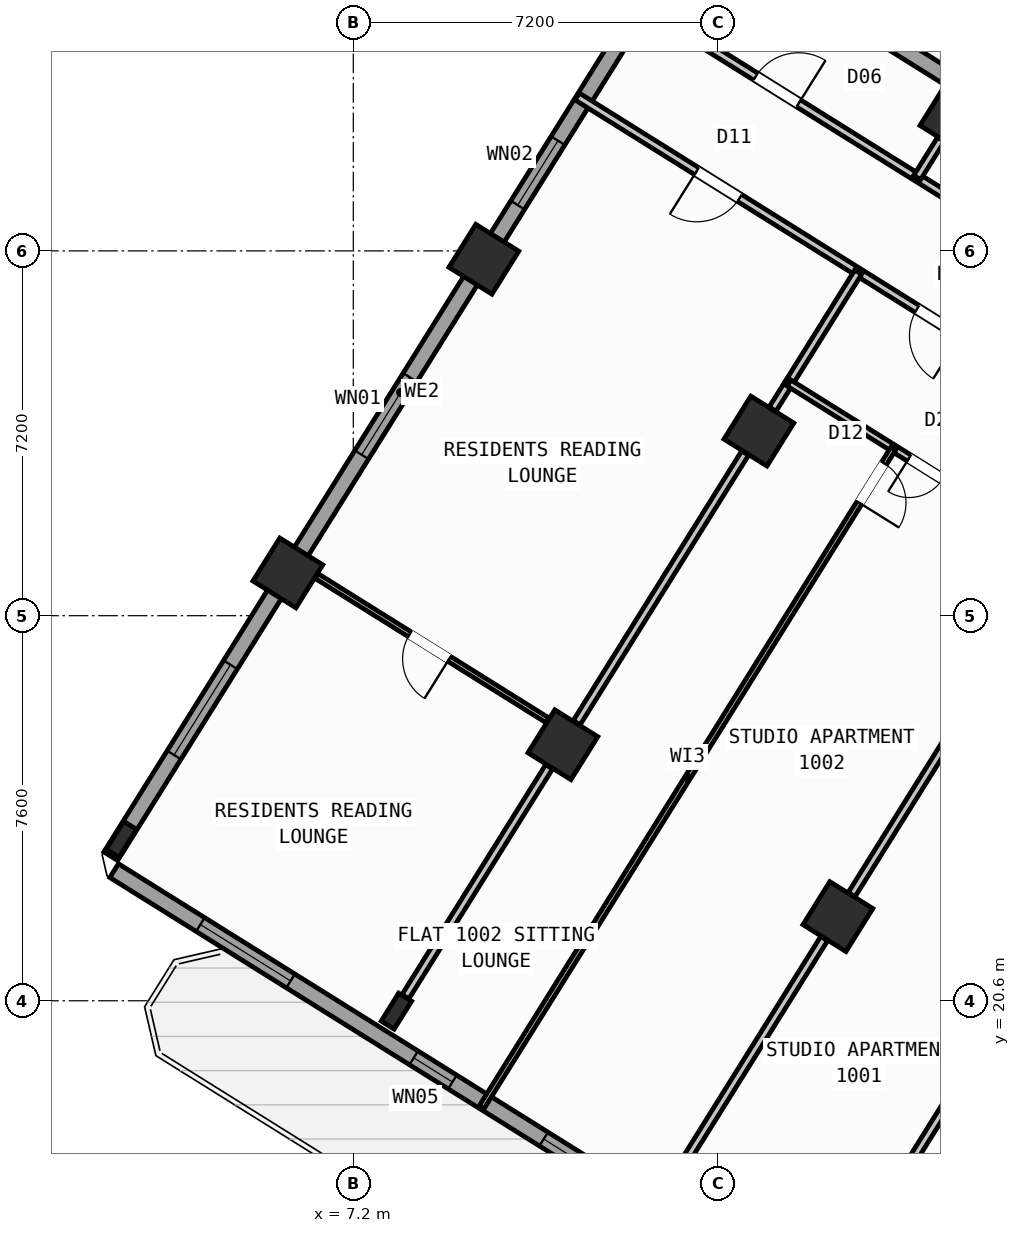
"""IFC4 building model, lengths in metres.
Left out: names, types, materials, properties, quantities, classifications, styles, units other than length and angle.
Written with IfcOpenShell. Run it as: python <this file> out.ifc"""

import sys

from ifc_helpers import new_model, si_unit, direction, frame, frame_2d, origin, origin_2d, place, context, subcontext, project, spatial, rectangle, hollow_rectangle, i_section, extrude, source, transform, mapped, element, fill, save


model = new_model("IFC4")
c1 = context("Model", 3, precision=1e-05, world=origin(), true_north=direction((0.0, 1.0)))
c2 = subcontext(c1, "Body", "Model", "MODEL_VIEW")
j1 = project(units=[si_unit("LENGTHUNIT", "METRE"), si_unit("PLANEANGLEUNIT", "RADIAN")], contexts=[c1])
p1 = place(None, origin())
s1 = spatial("IfcSite", under=j1, at=p1, CompositionType="ELEMENT")
p2 = place(p1, origin())
s2 = spatial("IfcBuilding", under=s1, at=p2, CompositionType="ELEMENT")
p3 = place(p2, frame((0.0, 0.0, 42.0)))
s3 = spatial("IfcBuildingStorey", under=s2, at=p3, CompositionType="ELEMENT", Elevation=42.0)
m1 = source(origin(), c2, "Body", "SweptSolid", [
    extrude(hollow_rectangle(XDim=1.0, YDim=1.0, WallThickness=0.04, at=origin_2d()), origin(), (0.0, 0.0, 1.0), 3.6),
])
for number, where, z_axis, x_axis in (
    (1, (16.764, 22.261, 0.0), (0.0, 0.0, 1.0), (-0.848, 0.53, 0.0)),
    (2, (19.073, 38.034, 0.0), (0.0, 0.0, 1.0), (-0.848, 0.53, 0.0)),
    (3, (15.205, 31.844, 0.0), (0.0, 0.0, 1.0), (-0.848, 0.53, 0.0)),
    (4, (11.336, 25.653, 0.0), (0.0, 0.0, 1.0), (-0.848, 0.53, 0.0)),
):
    element("IfcColumn", number, at=place(p3, frame(where, z_axis=z_axis, x_axis=x_axis)), inside=s3, PredefinedType="COLUMN", context=c2, shape_type="MappedRepresentation", body=[
        mapped(m1, transform((0.0, 0.0, 0.0), scale=1.0)),
    ])
m2 = source(origin(), c2, "Body", "SweptSolid", [
    extrude(i_section(OverallWidth=0.3, OverallDepth=0.65, WebThickness=0.016, FlangeThickness=0.031, at=origin_2d()), origin(), (0.0, 0.0, 1.0), 3.6),
])
p4 = place(p3, frame((8.051, 20.395, 0.0), z_axis=(0.0, 0.0, 1.0), x_axis=(-0.848048096156, 0.529919264233, 0.0)))
e5 = element("IfcColumn", 5, at=p4, inside=s3, PredefinedType="COLUMN", context=c2, shape_type="MappedRepresentation", body=[
    mapped(m2, transform((0.0, 0.0, 0.0), scale=1.0)),
])
for number, where, z_axis, x_axis in (
    (6, (9.777, 35.235, 0.0), (0.0, 0.0, 1.0), (-0.848, 0.53, 0.0)),
    (7, (5.909, 29.044, 0.0), (0.0, 0.0, 1.0), (-0.848, 0.53, 0.0)),
):
    element("IfcColumn", number, at=place(p3, frame(where, z_axis=z_axis, x_axis=x_axis)), inside=s3, PredefinedType="COLUMN", context=c2, shape_type="MappedRepresentation", body=[
        mapped(m1, transform((0.0, 0.0, 0.0), scale=1.0)),
    ])
p5 = place(p3, frame((2.623, 23.786, 0.0), z_axis=(0.0, 0.0, 1.0), x_axis=(-0.848048096156, 0.529919264233, 0.0)))
e8 = element("IfcColumn", 8, at=p5, inside=s3, PredefinedType="COLUMN", context=c2, shape_type="MappedRepresentation", body=[
    mapped(m2, transform((0.0, 0.0, 0.0), scale=1.0)),
])
p6 = place(p3, frame((29.268, 6.429, 0.0), z_axis=(0.0, 0.0, 1.0), x_axis=(-0.848049971435, 0.529916263149, 0.0)))
e9 = element("IfcWall", 9, at=p6, inside=s3, PredefinedType="STANDARD", context=c2, shape_type="SweptSolid", body=[
    extrude(rectangle(XDim=31.588, YDim=0.32, at=frame_2d((15.794, 0.0))), origin(), (0.0, 0.0, 1.0), 3.35),
])
p7 = place(p6, frame((16.362, 0.0, 0.0)))
e10 = element("IfcOpeningElement", 10, at=p7, cuts=e9, PredefinedType="OPENING", context=c2, shape_type="SweptSolid", body=[
    extrude(rectangle(XDim=1.2, YDim=2.15, at=frame_2d((0.6, 1.075))), frame((0.0, 0.17, 0.0), z_axis=(0.0, -1.0, 0.0), x_axis=(1.0, 0.0, 0.0)), (0.0, 0.0, 1.0), 0.34),
])
p8 = place(p6, frame((2.989, 0.0, 0.8)))
e11 = element("IfcOpeningElement", 11, at=p8, cuts=e9, PredefinedType="OPENING", context=c2, shape_type="SweptSolid", body=[
    extrude(rectangle(XDim=2.1, YDim=1.55, at=frame_2d((1.05, 0.775))), frame((0.0, 0.17, 0.0), z_axis=(0.0, -1.0, 0.0), x_axis=(1.0, 0.0, 0.0)), (0.0, 0.0, 1.0), 0.34),
])
p9 = place(p6, frame((8.359, 0.0, 0.8)))
e12 = element("IfcOpeningElement", 12, at=p9, cuts=e9, PredefinedType="OPENING", context=c2, shape_type="SweptSolid", body=[
    extrude(rectangle(XDim=2.1, YDim=1.55, at=frame_2d((1.05, 0.775))), frame((0.0, 0.17, 0.0), z_axis=(0.0, -1.0, 0.0), x_axis=(1.0, 0.0, 0.0)), (0.0, 0.0, 1.0), 0.34),
])
p10 = place(p6, frame((13.284, 0.0, 0.95)))
e13 = element("IfcOpeningElement", 13, at=p10, cuts=e9, PredefinedType="OPENING", context=c2, shape_type="SweptSolid", body=[
    extrude(rectangle(XDim=1.2, YDim=1.4, at=frame_2d((0.6, 0.7))), frame((0.0, 0.17, 0.0), z_axis=(0.0, -1.0, 0.0), x_axis=(1.0, 0.0, 0.0)), (0.0, 0.0, 1.0), 0.34),
])
p11 = place(p6, frame((20.39, 0.0, 0.95)))
e14 = element("IfcOpeningElement", 14, at=p11, cuts=e9, PredefinedType="OPENING", context=c2, shape_type="SweptSolid", body=[
    extrude(rectangle(XDim=1.2, YDim=1.4, at=frame_2d((0.6, 0.7))), frame((0.0, 0.17, 0.0), z_axis=(0.0, -1.0, 0.0), x_axis=(1.0, 0.0, 0.0)), (0.0, 0.0, 1.0), 0.34),
])
p12 = place(p6, frame((23.715, 0.0, 1.0)))
e15 = element("IfcOpeningElement", 15, at=p12, cuts=e9, PredefinedType="OPENING", context=c2, shape_type="SweptSolid", body=[
    extrude(rectangle(XDim=0.9, YDim=1.25, at=frame_2d((0.45, 0.625))), frame((0.0, 0.17, 0.0), z_axis=(0.0, -1.0, 0.0), x_axis=(1.0, 0.0, 0.0)), (0.0, 0.0, 1.0), 0.34),
])
p13 = place(p6, frame((27.481, 0.0, 0.8)))
e16 = element("IfcOpeningElement", 16, at=p13, cuts=e9, PredefinedType="OPENING", context=c2, shape_type="SweptSolid", body=[
    extrude(rectangle(XDim=2.1, YDim=1.55, at=frame_2d((1.05, 0.775))), frame((0.0, 0.17, 0.0), z_axis=(0.0, -1.0, 0.0), x_axis=(1.0, 0.0, 0.0)), (0.0, 0.0, 1.0), 0.34),
])
p14 = place(p3, frame((2.415, 23.452, 0.0), z_axis=(0.0, 0.0, 1.0), x_axis=(0.52991049553, 0.848053575387, 0.0)))
e17 = element("IfcWall", 17, at=p14, inside=s3, PredefinedType="STANDARD", context=c2, shape_type="SweptSolid", body=[
    extrude(rectangle(XDim=21.587, YDim=0.32, at=frame_2d((10.794, 0.0))), origin(), (0.0, 0.0, 1.0), 2.725),
])
p15 = place(p14, frame((2.356, 0.0, 0.8)))
e18 = element("IfcOpeningElement", 18, at=p15, cuts=e17, PredefinedType="OPENING", context=c2, shape_type="SweptSolid", body=[
    extrude(rectangle(XDim=2.1, YDim=1.55, at=frame_2d((1.05, 0.775))), frame((0.0, 0.17, 0.0), z_axis=(0.0, -1.0, 0.0), x_axis=(1.0, 0.0, 0.0)), (0.0, 0.0, 1.0), 0.34),
])
p16 = place(p14, frame((9.344, 0.0, 0.85)))
e19 = element("IfcOpeningElement", 19, at=p16, cuts=e17, PredefinedType="OPENING", context=c2, shape_type="SweptSolid", body=[
    extrude(rectangle(XDim=1.8, YDim=1.5, at=frame_2d((0.9, 0.75))), frame((0.0, 0.17, 0.0), z_axis=(0.0, -1.0, 0.0), x_axis=(1.0, 0.0, 0.0)), (0.0, 0.0, 1.0), 0.34),
])
p17 = place(p14, frame((15.154, 0.0, 0.85)))
e20 = element("IfcOpeningElement", 20, at=p17, cuts=e17, PredefinedType="OPENING", context=c2, shape_type="SweptSolid", body=[
    extrude(rectangle(XDim=1.5, YDim=1.5, at=frame_2d((0.75, 0.75))), frame((0.0, 0.17, 0.0), z_axis=(0.0, -1.0, 0.0), x_axis=(1.0, 0.0, 0.0)), (0.0, 0.0, 1.0), 0.34),
])
p18 = place(p3, frame((14.138, 41.825, 0.0), z_axis=(0.0, 0.0, 1.0), x_axis=(0.848046498049, -0.529921821731, 0.0)))
e21 = element("IfcWall", 21, at=p18, inside=s3, PredefinedType="STANDARD", context=c2, shape_type="SweptSolid", body=[
    extrude(rectangle(XDim=31.588, YDim=0.32, at=frame_2d((15.794, 0.0))), origin(), (0.0, 0.0, 1.0), 3.35),
])
p19 = place(p18, frame((3.369, 0.0, 0.0)))
e22 = element("IfcOpeningElement", 22, at=p19, cuts=e21, PredefinedType="OPENING", context=c2, shape_type="SweptSolid", body=[
    extrude(rectangle(XDim=1.05, YDim=2.15, at=frame_2d((0.525, 1.075))), frame((0.0, 0.17, 0.0), z_axis=(0.0, -1.0, 0.0), x_axis=(1.0, 0.0, 0.0)), (0.0, 0.0, 1.0), 0.34),
])
p20 = place(p18, frame((0.946, 0.0, 0.85)))
e23 = element("IfcOpeningElement", 23, at=p20, cuts=e21, PredefinedType="OPENING", context=c2, shape_type="SweptSolid", body=[
    extrude(rectangle(XDim=1.8, YDim=1.5, at=frame_2d((0.9, 0.75))), frame((0.0, 0.17, 0.0), z_axis=(0.0, -1.0, 0.0), x_axis=(1.0, 0.0, 0.0)), (0.0, 0.0, 1.0), 0.34),
])
p21 = place(p18, frame((8.46, 0.0, 0.85)))
e24 = element("IfcOpeningElement", 24, at=p21, cuts=e21, PredefinedType="OPENING", context=c2, shape_type="SweptSolid", body=[
    extrude(rectangle(XDim=1.8, YDim=1.5, at=frame_2d((0.9, 0.75))), frame((0.0, 0.17, 0.0), z_axis=(0.0, -1.0, 0.0), x_axis=(1.0, 0.0, 0.0)), (0.0, 0.0, 1.0), 0.34),
])
p22 = place(p18, frame((13.899, 0.0, 0.85)))
e25 = element("IfcOpeningElement", 25, at=p22, cuts=e21, PredefinedType="OPENING", context=c2, shape_type="SweptSolid", body=[
    extrude(rectangle(XDim=1.5, YDim=1.5, at=frame_2d((0.75, 0.75))), frame((0.0, 0.17, 0.0), z_axis=(0.0, -1.0, 0.0), x_axis=(1.0, 0.0, 0.0)), (0.0, 0.0, 1.0), 0.34),
])
p23 = place(p18, frame((22.019, 0.0, 0.95)))
e26 = element("IfcOpeningElement", 26, at=p23, cuts=e21, PredefinedType="OPENING", context=c2, shape_type="SweptSolid", body=[
    extrude(rectangle(XDim=1.2, YDim=1.4, at=frame_2d((0.6, 0.7))), frame((0.0, 0.17, 0.0), z_axis=(0.0, -1.0, 0.0), x_axis=(1.0, 0.0, 0.0)), (0.0, 0.0, 1.0), 0.34),
])
p24 = place(p18, frame((27.569, 0.0, 0.95)))
e27 = element("IfcOpeningElement", 27, at=p24, cuts=e21, PredefinedType="OPENING", context=c2, shape_type="SweptSolid", body=[
    extrude(rectangle(XDim=1.2, YDim=1.4, at=frame_2d((0.6, 0.7))), frame((0.0, 0.17, 0.0), z_axis=(0.0, -1.0, 0.0), x_axis=(1.0, 0.0, 0.0)), (0.0, 0.0, 1.0), 0.34),
])
p25 = place(p3, frame((25.807, 29.582, 0.0), z_axis=(0.0, 0.0, 1.0), x_axis=(-0.529918119251, -0.84804881162, 0.0)))
e28 = element("IfcWall", 28, at=p25, inside=s3, PredefinedType="PARTITIONING", context=c2, shape_type="SweptSolid", body=[
    extrude(rectangle(XDim=17.65, YDim=0.16, at=frame_2d((8.825, 0.0))), origin(), (0.0, 0.0, 1.0), 3.34),
])
p26 = place(p3, frame((26.973, 31.447, 0.0), z_axis=(0.0, 0.0, 1.0), x_axis=(-0.848048310262, 0.529918921593, 0.0)))
e29 = element("IfcWall", 29, at=p26, inside=s3, PredefinedType="PARTITIONING", context=c2, shape_type="SweptSolid", body=[
    extrude(rectangle(XDim=16.73, YDim=0.16, at=frame_2d((8.365, 0.0))), origin(), (0.0, 0.0, 1.0), 3.34),
])
p27 = place(p26, frame((1.588, 0.0, 0.0)))
e30 = element("IfcOpeningElement", 30, at=p27, cuts=e29, PredefinedType="OPENING", context=c2, shape_type="SweptSolid", body=[
    extrude(rectangle(XDim=1.0, YDim=2.1, at=frame_2d((0.5, 1.05))), frame((0.0, 0.09, 0.0), z_axis=(0.0, -1.0, 0.0), x_axis=(1.0, 0.0, 0.0)), (0.0, 0.0, 1.0), 0.18),
])
p28 = place(p26, frame((6.685, 0.0, 0.0)))
e31 = element("IfcOpeningElement", 31, at=p28, cuts=e29, PredefinedType="OPENING", context=c2, shape_type="SweptSolid", body=[
    extrude(rectangle(XDim=1.0, YDim=2.1, at=frame_2d((0.5, 1.05))), frame((0.0, 0.09, 0.0), z_axis=(0.0, -1.0, 0.0), x_axis=(1.0, 0.0, 0.0)), (0.0, 0.0, 1.0), 0.18),
])
p29 = place(p26, frame((12.951, 0.0, 0.0)))
e32 = element("IfcOpeningElement", 32, at=p29, cuts=e29, PredefinedType="OPENING", context=c2, shape_type="SweptSolid", body=[
    extrude(rectangle(XDim=1.0, YDim=2.1, at=frame_2d((0.5, 1.05))), frame((0.0, 0.09, 0.0), z_axis=(0.0, -1.0, 0.0), x_axis=(1.0, 0.0, 0.0)), (0.0, 0.0, 1.0), 0.18),
])
p30 = place(p3, frame((25.807, 29.582, 0.0), z_axis=(0.0, 0.0, 1.0), x_axis=(-0.848052408131, 0.529912363569, 0.0)))
e33 = element("IfcWall", 33, at=p30, inside=s3, PredefinedType="PARTITIONING", context=c2, shape_type="SweptSolid", body=[
    extrude(rectangle(XDim=16.73, YDim=0.16, at=frame_2d((8.365, 0.0))), origin(), (0.0, 0.0, 1.0), 3.34),
])
p31 = place(p30, frame((2.22, 0.0, 0.0)))
e34 = element("IfcOpeningElement", 34, at=p31, cuts=e33, PredefinedType="OPENING", context=c2, shape_type="SweptSolid", body=[
    extrude(rectangle(XDim=0.86, YDim=2.05, at=frame_2d((0.43, 1.025))), frame((0.0, 0.09, 0.0), z_axis=(0.0, -1.0, 0.0), x_axis=(1.0, 0.0, 0.0)), (0.0, 0.0, 1.0), 0.18),
])
p32 = place(p30, frame((7.82, 0.0, 0.0)))
e35 = element("IfcOpeningElement", 35, at=p32, cuts=e33, PredefinedType="OPENING", context=c2, shape_type="SweptSolid", body=[
    extrude(rectangle(XDim=1.0, YDim=2.1, at=frame_2d((0.5, 1.05))), frame((0.0, 0.09, 0.0), z_axis=(0.0, -1.0, 0.0), x_axis=(1.0, 0.0, 0.0)), (0.0, 0.0, 1.0), 0.18),
])
p33 = place(p30, frame((12.95, 0.0, 0.0)))
e36 = element("IfcOpeningElement", 36, at=p33, cuts=e33, PredefinedType="OPENING", context=c2, shape_type="SweptSolid", body=[
    extrude(rectangle(XDim=1.0, YDim=2.1, at=frame_2d((0.5, 1.05))), frame((0.0, 0.09, 0.0), z_axis=(0.0, -1.0, 0.0), x_axis=(1.0, 0.0, 0.0)), (0.0, 0.0, 1.0), 0.18),
])
p34 = place(p3, frame((20.361, 28.018, 0.0), z_axis=(0.0, 0.0, 1.0), x_axis=(-0.529915015264, -0.848050751193, 0.0)))
e37 = element("IfcWall", 37, at=p34, inside=s3, PredefinedType="PARTITIONING", context=c2, shape_type="SweptSolid", body=[
    extrude(rectangle(XDim=6.276, YDim=0.16, at=frame_2d((3.138, 0.0))), origin(), (0.0, 0.0, 1.0), 2.725),
])
p35 = place(p3, frame((16.492, 21.827, 0.0), z_axis=(0.0, 0.0, 1.0), x_axis=(-0.529904608059, -0.848057254175, 0.0)))
e38 = element("IfcWall", 38, at=p35, inside=s3, PredefinedType="PARTITIONING", context=c2, shape_type="SweptSolid", body=[
    extrude(rectangle(XDim=5.351, YDim=0.16, at=frame_2d((2.675, 0.0))), origin(), (0.0, 0.0, 1.0), 2.725),
])
p36 = place(p3, frame((17.165, 34.981, 0.0), z_axis=(0.0, 0.0, 1.0), x_axis=(-0.529930102756, -0.848041323399, 0.0)))
e39 = element("IfcWall", 39, at=p36, inside=s3, PredefinedType="PARTITIONING", context=c2, shape_type="SweptSolid", body=[
    extrude(rectangle(XDim=3.188, YDim=0.16, at=frame_2d((1.594, 0.0))), origin(), (0.0, 0.0, 1.0), 2.725),
])
p37 = place(p3, frame((14.933, 31.409, 0.0), z_axis=(0.0, 0.0, 1.0), x_axis=(-0.529897533635, -0.848061674554, 0.0)))
e40 = element("IfcWall", 40, at=p37, inside=s3, PredefinedType="PARTITIONING", context=c2, shape_type="SweptSolid", body=[
    extrude(rectangle(XDim=6.276, YDim=0.16, at=frame_2d((3.138, 0.0))), origin(), (0.0, 0.0, 1.0), 2.725),
])
p38 = place(p3, frame((11.065, 25.219, 0.0), z_axis=(0.0, 0.0, 1.0), x_axis=(-0.529904608059, -0.848057254175, 0.0)))
e41 = element("IfcWall", 41, at=p38, inside=s3, PredefinedType="PARTITIONING", context=c2, shape_type="SweptSolid", body=[
    extrude(rectangle(XDim=5.351, YDim=0.16, at=frame_2d((2.675, 0.0))), origin(), (0.0, 0.0, 1.0), 2.725),
])
p39 = place(p3, frame((21.226, 29.402, 0.0), z_axis=(0.0, 0.0, 1.0), x_axis=(-0.848039019877, 0.529933789039, 0.0)))
e42 = element("IfcWall", 42, at=p39, inside=s3, PredefinedType="PLUMBINGWALL", context=c2, shape_type="SweptSolid", body=[
    extrude(rectangle(XDim=6.4, YDim=0.14, at=frame_2d((3.2, 0.0))), origin(), (0.0, 0.0, 1.0), 3.34),
])
p40 = place(p39, frame((2.824, 0.0, 0.0)))
e43 = element("IfcOpeningElement", 43, at=p40, cuts=e42, PredefinedType="OPENING", context=c2, shape_type="SweptSolid", body=[
    extrude(rectangle(XDim=0.78, YDim=2.05, at=frame_2d((0.39, 1.025))), frame((0.0, 0.08, 0.0), z_axis=(0.0, -1.0, 0.0), x_axis=(1.0, 0.0, 0.0)), (0.0, 0.0, 1.0), 0.16),
])
p41 = place(p3, frame((17.861, 31.505, 0.0), z_axis=(0.0, 0.0, 1.0), x_axis=(-0.529928839727, -0.848042112649, 0.0)))
e44 = element("IfcWall", 44, at=p41, inside=s3, PredefinedType="PARTITIONING", context=c2, shape_type="SweptSolid", body=[
    extrude(rectangle(XDim=15.34, YDim=0.11, at=frame_2d((7.67, 0.0))), origin(), (0.0, 0.0, 1.0), 3.34),
])
p42 = place(p41, frame((0.35, 0.0, 0.0)))
e45 = element("IfcOpeningElement", 45, at=p42, cuts=e44, PredefinedType="OPENING", context=c2, shape_type="SweptSolid", body=[
    extrude(rectangle(XDim=0.92, YDim=2.08, at=frame_2d((0.46, 1.04))), frame((0.0, 0.065, 0.0), z_axis=(0.0, -1.0, 0.0), x_axis=(1.0, 0.0, 0.0)), (0.0, 0.0, 1.0), 0.13),
])
p43 = place(p3, frame((11.033, 26.135, 0.0), z_axis=(0.0, 0.0, 1.0), x_axis=(-0.848044224181, 0.529925460639, 0.0)))
e46 = element("IfcWall", 46, at=p43, inside=s3, PredefinedType="PARTITIONING", context=c2, shape_type="SweptSolid", body=[
    extrude(rectangle(XDim=5.376, YDim=0.11, at=frame_2d((2.688, 0.0))), origin(), (0.0, 0.0, 1.0), 2.725),
])
p44 = place(p43, frame((2.288, 0.0, 0.0)))
e47 = element("IfcOpeningElement", 47, at=p44, cuts=e46, PredefinedType="OPENING", context=c2, shape_type="SweptSolid", body=[
    extrude(rectangle(XDim=0.92, YDim=2.08, at=frame_2d((0.46, 1.04))), frame((0.0, 0.065, 0.0), z_axis=(0.0, -1.0, 0.0), x_axis=(1.0, 0.0, 0.0)), (0.0, 0.0, 1.0), 0.13),
])
p45 = place(p3, frame((18.799, 37.602, 0.0), z_axis=(0.0, 0.0, 1.0), x_axis=(-0.529974231203, -0.848013746505, 0.0)))
e48 = element("IfcWall", 48, at=p45, inside=s3, PredefinedType="PARTITIONING", context=c2, shape_type="SweptSolid", body=[
    extrude(rectangle(XDim=0.888, YDim=0.16, at=frame_2d((0.444, 0.0))), origin(), (0.0, 0.0, 1.0), 2.725),
])
m3 = source(origin(), c2, "Body", "SweptSolid", [
    extrude(rectangle(XDim=1.2, YDim=1.4, at=frame_2d((0.6, 0.7))), frame((0.0, 0.03, 0.0), z_axis=(0.0, -1.0, 0.0), x_axis=(1.0, 0.0, 0.0)), (0.0, 0.0, 1.0), 0.06),
])
p46 = place(p11, origin())
e49 = element("IfcWindow", 49, at=p46, inside=s3, PartitioningType="SINGLE_PANEL", PredefinedType="WINDOW", context=c2, shape_type="MappedRepresentation", body=[
    mapped(m3, transform((0.0, 0.0, 0.0), scale=1.0)),
])
fill(e14, e49)
m4 = source(origin(), c2, "Body", "SweptSolid", [
    extrude(rectangle(XDim=0.9, YDim=1.25, at=frame_2d((0.45, 0.625))), frame((0.0, 0.03, 0.0), z_axis=(0.0, -1.0, 0.0), x_axis=(1.0, 0.0, 0.0)), (0.0, 0.0, 1.0), 0.06),
])
p47 = place(p12, origin())
e50 = element("IfcWindow", 50, at=p47, inside=s3, PartitioningType="SINGLE_PANEL", PredefinedType="WINDOW", context=c2, shape_type="MappedRepresentation", body=[
    mapped(m4, transform((0.0, 0.0, 0.0), scale=1.0)),
])
fill(e15, e50)
m5 = source(origin(), c2, "Body", "SweptSolid", [
    extrude(rectangle(XDim=2.1, YDim=1.55, at=frame_2d((1.05, 0.775))), frame((0.0, 0.03, 0.0), z_axis=(0.0, -1.0, 0.0), x_axis=(1.0, 0.0, 0.0)), (0.0, 0.0, 1.0), 0.06),
])
p48 = place(p13, origin())
e51 = element("IfcWindow", 51, at=p48, inside=s3, PartitioningType="SINGLE_PANEL", PredefinedType="WINDOW", context=c2, shape_type="MappedRepresentation", body=[
    mapped(m5, transform((0.0, 0.0, 0.0), scale=1.0)),
])
fill(e16, e51)
p49 = place(p15, origin())
e52 = element("IfcWindow", 52, at=p49, inside=s3, PartitioningType="SINGLE_PANEL", PredefinedType="WINDOW", context=c2, shape_type="MappedRepresentation", body=[
    mapped(m5, transform((0.0, 0.0, 0.0), scale=1.0)),
])
fill(e18, e52)
m6 = source(origin(), c2, "Body", "SweptSolid", [
    extrude(rectangle(XDim=1.8, YDim=1.5, at=frame_2d((0.9, 0.75))), frame((0.0, 0.03, 0.0), z_axis=(0.0, -1.0, 0.0), x_axis=(1.0, 0.0, 0.0)), (0.0, 0.0, 1.0), 0.06),
])
p50 = place(p16, origin())
e53 = element("IfcWindow", 53, at=p50, inside=s3, PartitioningType="SINGLE_PANEL", PredefinedType="WINDOW", context=c2, shape_type="MappedRepresentation", body=[
    mapped(m6, transform((0.0, 0.0, 0.0), scale=1.0)),
])
fill(e19, e53)
m7 = source(origin(), c2, "Body", "SweptSolid", [
    extrude(rectangle(XDim=1.5, YDim=1.5, at=frame_2d((0.75, 0.75))), frame((0.0, 0.03, 0.0), z_axis=(0.0, -1.0, 0.0), x_axis=(1.0, 0.0, 0.0)), (0.0, 0.0, 1.0), 0.06),
])
p51 = place(p17, origin())
e54 = element("IfcWindow", 54, at=p51, inside=s3, PartitioningType="SINGLE_PANEL", PredefinedType="WINDOW", context=c2, shape_type="MappedRepresentation", body=[
    mapped(m7, transform((0.0, 0.0, 0.0), scale=1.0)),
])
fill(e20, e54)
m8 = source(origin(), c2, "Body", "SweptSolid", [
    extrude(rectangle(XDim=0.92, YDim=2.08, at=frame_2d((0.46, 1.04))), frame((0.0, 0.025, 0.0), z_axis=(0.0, -1.0, 0.0), x_axis=(1.0, 0.0, 0.0)), (0.0, 0.0, 1.0), 0.05),
])
p52 = place(p42, origin())
e55 = element("IfcDoor", 55, at=p52, inside=s3, OperationType="SINGLE_SWING_RIGHT", PredefinedType="DOOR", context=c2, shape_type="MappedRepresentation", body=[
    mapped(m8, transform((0.0, 0.0, 0.0), scale=1.0)),
])
fill(e45, e55)
m9 = source(origin(), c2, "Body", "SweptSolid", [
    extrude(rectangle(XDim=1.0, YDim=2.1, at=frame_2d((0.5, 1.05))), frame((0.0, 0.025, 0.0), z_axis=(0.0, -1.0, 0.0), x_axis=(1.0, 0.0, 0.0)), (0.0, 0.0, 1.0), 0.05),
])
p53 = place(p32, origin())
e56 = element("IfcDoor", 56, at=p53, inside=s3, OperationType="SINGLE_SWING_LEFT", PredefinedType="DOOR", context=c2, shape_type="MappedRepresentation", body=[
    mapped(m9, transform((0.0, 0.0, 0.0), scale=1.0)),
])
fill(e35, e56)
m10 = source(origin(), c2, "Body", "SweptSolid", [
    extrude(rectangle(XDim=0.78, YDim=2.05, at=frame_2d((0.39, 1.025))), frame((0.0, 0.025, 0.0), z_axis=(0.0, -1.0, 0.0), x_axis=(1.0, 0.0, 0.0)), (0.0, 0.0, 1.0), 0.05),
])
p54 = place(p40, origin())
e57 = element("IfcDoor", 57, at=p54, inside=s3, OperationType="SINGLE_SWING_RIGHT", PredefinedType="DOOR", context=c2, shape_type="MappedRepresentation", body=[
    mapped(m10, transform((0.0, 0.0, 0.0), scale=1.0)),
])
fill(e43, e57)
p55 = place(p33, origin())
e58 = element("IfcDoor", 58, at=p55, inside=s3, OperationType="SINGLE_SWING_RIGHT", PredefinedType="DOOR", context=c2, shape_type="MappedRepresentation", body=[
    mapped(m9, transform((0.0, 0.0, 0.0), scale=1.0)),
])
fill(e36, e58)
p56 = place(p44, origin())
e59 = element("IfcDoor", 59, at=p56, inside=s3, OperationType="SINGLE_SWING_LEFT", PredefinedType="DOOR", context=c2, shape_type="MappedRepresentation", body=[
    mapped(m8, transform((0.0, 0.0, 0.0), scale=1.0)),
])
fill(e47, e59)
p57 = place(p29, frame((1.0, 0.0, 0.0), z_axis=(0.0, 0.0, 1.0), x_axis=(-1.0, 0.0, 0.0)))
e60 = element("IfcDoor", 60, at=p57, inside=s3, OperationType="SINGLE_SWING_RIGHT", PredefinedType="DOOR", context=c2, shape_type="MappedRepresentation", body=[
    mapped(m9, transform((0.0, 0.0, 0.0), scale=1.0)),
])
fill(e32, e60)
save(model, sys.argv[1])
